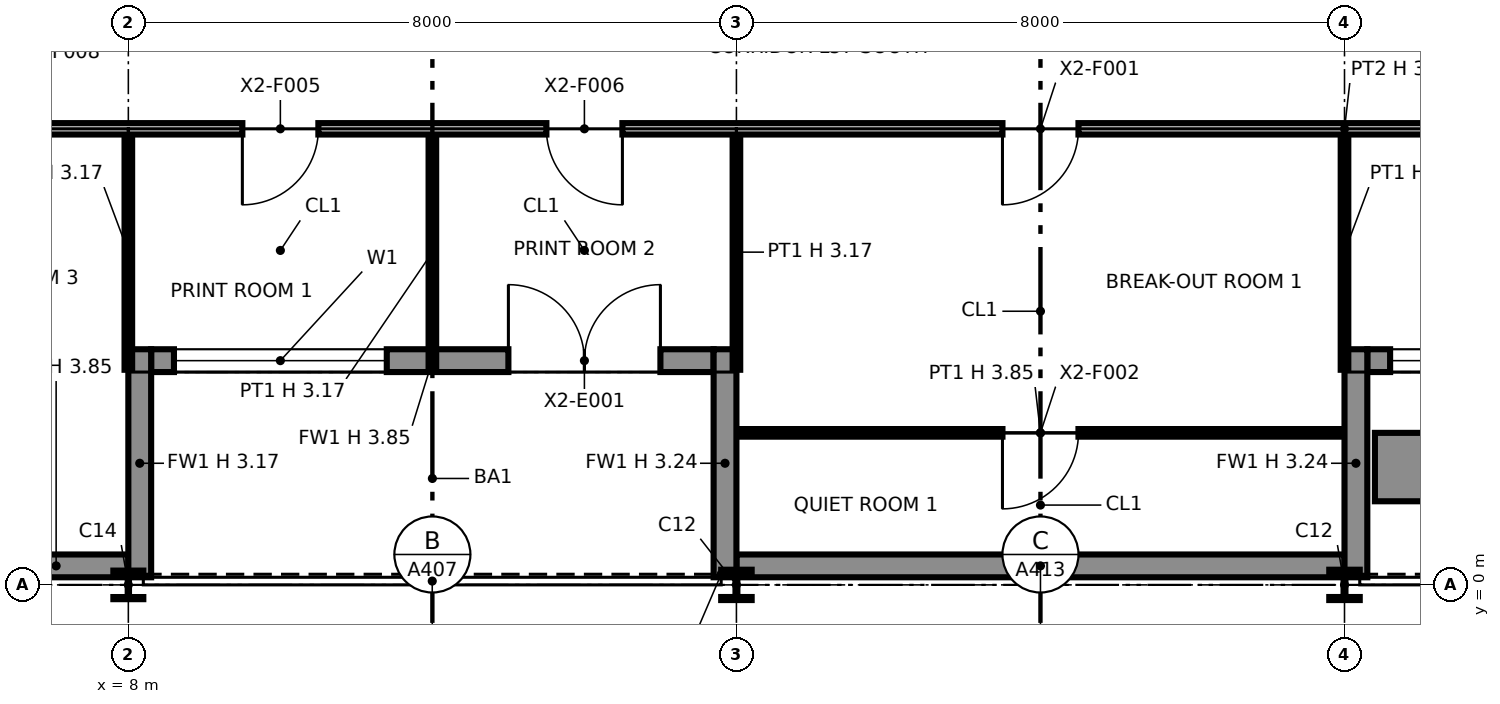
"""IFC4 building model, lengths in metres.
Left out: names, types, materials, properties, quantities, classifications, styles, units other than length and angle.
Written with IfcOpenShell. Run it as: python <this file> out.ifc"""

import sys

from ifc_helpers import new_model, si_unit, direction, frame, frame_2d, origin, origin_2d, place, context, subcontext, project, spatial, rectangle, i_section, extrude, element, fill, save


model = new_model("IFC4")
c1 = context("Model", 3, precision=1e-05, world=origin(), true_north=direction((0.0, 1.0)))
c2 = subcontext(c1, "Body", "Model", "MODEL_VIEW")
j1 = project(units=[si_unit("LENGTHUNIT", "METRE"), si_unit("PLANEANGLEUNIT", "RADIAN")], contexts=[c1])
p1 = place(None, origin())
s1 = spatial("IfcSite", under=j1, at=p1, CompositionType="ELEMENT")
p2 = place(p1, origin())
s2 = spatial("IfcBuilding", under=s1, at=p2, CompositionType="ELEMENT")
p3 = place(p2, frame((0.0, 0.0, 263.0)))
s3 = spatial("IfcBuildingStorey", under=s2, at=p3, CompositionType="ELEMENT", Elevation=263.0)
p4 = place(p3, frame((8.0, 0.0, 0.0), z_axis=(0.0, 0.0, 1.0), x_axis=(1.0, 0.0, 0.0)))
e1 = element("IfcColumn", 1, at=p4, inside=s3, PredefinedType="COLUMN", context=c2, shape_type="SweptSolid", body=[
    extrude(i_section(OverallWidth=0.394, OverallDepth=0.376, WebThickness=0.017, FlangeThickness=0.028, at=origin_2d()), origin(), (0.0, 0.0, 1.0), 3.85),
])
for number, where, z_axis, x_axis in (
    (2, (16.0, 0.0, 0.0), (0.0, 0.0, 1.0), (1.0, 0.0, 0.0)),
    (3, (24.0, 0.0, 0.0), (0.0, 0.0, 1.0), (1.0, 0.0, 0.0)),
):
    element("IfcColumn", number, at=place(p3, frame(where, z_axis=z_axis, x_axis=x_axis)), inside=s3, PredefinedType="COLUMN", context=c2, shape_type="SweptSolid", body=[
        extrude(i_section(OverallWidth=0.401, OverallDepth=0.399, WebThickness=0.025, FlangeThickness=0.04, at=origin_2d()), origin(), (0.0, 0.0, 1.0), 3.85),
    ])
p5 = place(p3, frame((6.1, 0.25, 0.0), z_axis=(0.0, 0.0, 1.0), x_axis=(1.0, 0.0, 0.0)))
e4 = element("IfcWall", 4, at=p5, inside=s3, PredefinedType="SOLIDWALL", context=c2, shape_type="SweptSolid", body=[
    extrude(rectangle(XDim=1.9, YDim=0.3, at=frame_2d((0.95, 0.0))), origin(), (0.0, 0.0, 1.0), 3.85),
])
p6 = place(p3, frame((8.3, 2.95, 0.0), z_axis=(0.0, 0.0, 1.0), x_axis=(1.0, 0.0, 0.0)))
e5 = element("IfcWall", 5, at=p6, inside=s3, PredefinedType="SOLIDWALL", context=c2, shape_type="SweptSolid", body=[
    extrude(rectangle(XDim=7.4, YDim=0.3, at=frame_2d((3.7, 0.0))), origin(), (0.0, 0.0, 1.0), 3.85),
])
p7 = place(p6, frame((0.3, 0.0, 0.9)))
e6 = element("IfcOpeningElement", 6, at=p7, cuts=e5, PredefinedType="OPENING", context=c2, shape_type="SweptSolid", body=[
    extrude(rectangle(XDim=2.8, YDim=2.2, at=frame_2d((1.4, 1.1))), frame((0.0, 0.16, 0.0), z_axis=(0.0, -1.0, 0.0), x_axis=(1.0, 0.0, 0.0)), (0.0, 0.0, 1.0), 0.32),
])
p8 = place(p6, frame((4.7, 0.0, 0.0)))
e7 = element("IfcOpeningElement", 7, at=p8, cuts=e5, PredefinedType="OPENING", context=c2, shape_type="SweptSolid", body=[
    extrude(rectangle(XDim=2.0, YDim=2.4, at=frame_2d((1.0, 1.2))), frame((0.0, 0.16, 0.0), z_axis=(0.0, -1.0, 0.0), x_axis=(1.0, 0.0, 0.0)), (0.0, 0.0, 1.0), 0.32),
])
p9 = place(p3, frame((8.15, 0.1, 0.0), z_axis=(0.0, 0.0, 1.0), x_axis=(0.0, 1.0, 0.0)))
e8 = element("IfcWall", 8, at=p9, inside=s3, PredefinedType="SOLIDWALL", context=c2, shape_type="SweptSolid", body=[
    extrude(rectangle(XDim=3.0, YDim=0.3, at=frame_2d((1.5, 0.0))), origin(), (0.0, 0.0, 1.0), 3.171),
])
p10 = place(p3, frame((15.85, 0.1, 0.0), z_axis=(0.0, 0.0, 1.0), x_axis=(0.0, 1.0, 0.0)))
e9 = element("IfcWall", 9, at=p10, inside=s3, PredefinedType="SOLIDWALL", context=c2, shape_type="SweptSolid", body=[
    extrude(rectangle(XDim=3.0, YDim=0.3, at=frame_2d((1.5, 0.0))), origin(), (0.0, 0.0, 1.0), 3.237),
])
p11 = place(p3, frame((16.0, 0.25, 0.0), z_axis=(0.0, 0.0, 1.0), x_axis=(1.0, 0.0, 0.0)))
e10 = element("IfcWall", 10, at=p11, inside=s3, PredefinedType="SOLIDWALL", context=c2, shape_type="SweptSolid", body=[
    extrude(rectangle(XDim=8.0, YDim=0.3, at=frame_2d((4.0, 0.0))), origin(), (0.0, 0.0, 1.0), 3.85),
])
p12 = place(p3, frame((24.3, 2.95, 0.0), z_axis=(0.0, 0.0, 1.0), x_axis=(1.0, 0.0, 0.0)))
e11 = element("IfcWall", 11, at=p12, inside=s3, PredefinedType="SOLIDWALL", context=c2, shape_type="SweptSolid", body=[
    extrude(rectangle(XDim=7.4, YDim=0.3, at=frame_2d((3.7, 0.0))), origin(), (0.0, 0.0, 1.0), 3.85),
])
p13 = place(p12, frame((0.3, 0.0, 0.9)))
e12 = element("IfcOpeningElement", 12, at=p13, cuts=e11, PredefinedType="OPENING", context=c2, shape_type="SweptSolid", body=[
    extrude(rectangle(XDim=2.8, YDim=2.2, at=frame_2d((1.4, 1.1))), frame((0.0, 0.16, 0.0), z_axis=(0.0, -1.0, 0.0), x_axis=(1.0, 0.0, 0.0)), (0.0, 0.0, 1.0), 0.32),
])
p14 = place(p12, frame((4.7, 0.0, 0.0)))
e13 = element("IfcOpeningElement", 13, at=p14, cuts=e11, PredefinedType="OPENING", context=c2, shape_type="SweptSolid", body=[
    extrude(rectangle(XDim=2.0, YDim=2.4, at=frame_2d((1.0, 1.2))), frame((0.0, 0.16, 0.0), z_axis=(0.0, -1.0, 0.0), x_axis=(1.0, 0.0, 0.0)), (0.0, 0.0, 1.0), 0.32),
])
p15 = place(p3, frame((24.15, 0.1, 0.0), z_axis=(0.0, 0.0, 1.0), x_axis=(0.0, 1.0, 0.0)))
e14 = element("IfcWall", 14, at=p15, inside=s3, PredefinedType="SOLIDWALL", context=c2, shape_type="SweptSolid", body=[
    extrude(rectangle(XDim=3.0, YDim=0.3, at=frame_2d((1.5, 0.0))), origin(), (0.0, 0.0, 1.0), 3.237),
])
p16 = place(p3, frame((24.4, 1.55, 0.0), z_axis=(0.0, 0.0, 1.0), x_axis=(1.0, 0.0, 0.0)))
e15 = element("IfcWall", 15, at=p16, inside=s3, PredefinedType="SOLIDWALL", context=c2, shape_type="SweptSolid", body=[
    extrude(rectangle(XDim=3.2, YDim=0.9, at=frame_2d((1.6, 0.0))), origin(), (0.0, 0.0, 1.0), 0.6),
])
p17 = place(p3, frame((16.03, 2.0, 0.0), z_axis=(0.0, 0.0, 1.0), x_axis=(1.0, 0.0, 0.0)))
e16 = element("IfcWall", 16, at=p17, inside=s3, PredefinedType="PARTITIONING", context=c2, shape_type="SweptSolid", body=[
    extrude(rectangle(XDim=7.94, YDim=0.1, at=frame_2d((3.97, 0.0))), origin(), (0.0, 0.0, 1.0), 3.85),
])
p18 = place(p17, frame((4.47, 0.0, 0.0), z_axis=(0.0, 0.0, 1.0), x_axis=(-1.0, 0.0, 0.0)))
e17 = element("IfcOpeningElement", 17, at=p18, cuts=e16, PredefinedType="OPENING", context=c2, shape_type="SweptSolid", body=[
    extrude(rectangle(XDim=1.0, YDim=2.1, at=frame_2d((0.5, 1.05))), frame((0.0, 0.06, 0.0), z_axis=(0.0, -1.0, 0.0), x_axis=(1.0, 0.0, 0.0)), (0.0, 0.0, 1.0), 0.12),
])
for number, where, z_axis, x_axis in (
    (18, (8.0, 2.83, 0.0), (0.0, 0.0, 1.0), (0.0, 1.0, 0.0)),
    (19, (12.0, 2.83, 0.0), (0.0, 0.0, 1.0), (0.0, 1.0, 0.0)),
    (20, (16.0, 2.83, 0.0), (0.0, 0.0, 1.0), (0.0, 1.0, 0.0)),
    (21, (24.0, 2.83, 0.0), (0.0, 0.0, 1.0), (0.0, 1.0, 0.0)),
):
    element("IfcWall", number, at=place(p3, frame(where, z_axis=z_axis, x_axis=x_axis)), inside=s3, PredefinedType="PARTITIONING", context=c2, shape_type="SweptSolid", body=[
        extrude(rectangle(XDim=3.095, YDim=0.1, at=frame_2d((1.547, 0.0))), origin(), (0.0, 0.0, 1.0), 3.172),
    ])
p19 = place(p3, frame((6.075, 6.0, 0.0), z_axis=(0.0, 0.0, 1.0), x_axis=(1.0, 0.0, 0.0)))
e22 = element("IfcWall", 22, at=p19, inside=s3, PredefinedType="PARTITIONING", context=c2, shape_type="SweptSolid", body=[
    extrude(rectangle(XDim=35.85, YDim=0.15, at=frame_2d((17.925, 0.0))), origin(), (0.0, 0.0, 1.0), 3.85),
])
p20 = place(p19, frame((14.425, 0.0, 0.0), z_axis=(0.0, 0.0, 1.0), x_axis=(-1.0, 0.0, 0.0)))
e23 = element("IfcOpeningElement", 23, at=p20, cuts=e22, PredefinedType="OPENING", context=c2, shape_type="SweptSolid", body=[
    extrude(rectangle(XDim=1.0, YDim=2.1, at=frame_2d((0.5, 1.05))), frame((0.0, 0.085, 0.0), z_axis=(0.0, -1.0, 0.0), x_axis=(1.0, 0.0, 0.0)), (0.0, 0.0, 1.0), 0.17),
])
p21 = place(p19, frame((30.425, 0.0, 0.0), z_axis=(0.0, 0.0, 1.0), x_axis=(-1.0, 0.0, 0.0)))
e24 = element("IfcOpeningElement", 24, at=p21, cuts=e22, PredefinedType="OPENING", context=c2, shape_type="SweptSolid", body=[
    extrude(rectangle(XDim=1.0, YDim=2.1, at=frame_2d((0.5, 1.05))), frame((0.0, 0.085, 0.0), z_axis=(0.0, -1.0, 0.0), x_axis=(1.0, 0.0, 0.0)), (0.0, 0.0, 1.0), 0.17),
])
p22 = place(p19, frame((4.425, 0.0, 0.0), z_axis=(0.0, 0.0, 1.0), x_axis=(-1.0, 0.0, 0.0)))
e25 = element("IfcOpeningElement", 25, at=p22, cuts=e22, PredefinedType="OPENING", context=c2, shape_type="SweptSolid", body=[
    extrude(rectangle(XDim=1.0, YDim=2.1, at=frame_2d((0.5, 1.05))), frame((0.0, 0.085, 0.0), z_axis=(0.0, -1.0, 0.0), x_axis=(1.0, 0.0, 0.0)), (0.0, 0.0, 1.0), 0.17),
])
p23 = place(p19, frame((8.425, 0.0, 0.0), z_axis=(0.0, 0.0, 1.0), x_axis=(-1.0, 0.0, 0.0)))
e26 = element("IfcOpeningElement", 26, at=p23, cuts=e22, PredefinedType="OPENING", context=c2, shape_type="SweptSolid", body=[
    extrude(rectangle(XDim=1.0, YDim=2.1, at=frame_2d((0.5, 1.05))), frame((0.0, 0.085, 0.0), z_axis=(0.0, -1.0, 0.0), x_axis=(1.0, 0.0, 0.0)), (0.0, 0.0, 1.0), 0.17),
])
p24 = place(p19, frame((23.425, 0.0, 0.0), z_axis=(0.0, 0.0, 1.0), x_axis=(-1.0, 0.0, 0.0)))
e27 = element("IfcOpeningElement", 27, at=p24, cuts=e22, PredefinedType="OPENING", context=c2, shape_type="SweptSolid", body=[
    extrude(rectangle(XDim=1.0, YDim=2.1, at=frame_2d((0.5, 1.05))), frame((0.0, 0.085, 0.0), z_axis=(0.0, -1.0, 0.0), x_axis=(1.0, 0.0, 0.0)), (0.0, 0.0, 1.0), 0.17),
])
p25 = place(p19, frame((35.425, 0.0, 0.0), z_axis=(0.0, 0.0, 1.0), x_axis=(-1.0, 0.0, 0.0)))
e28 = element("IfcOpeningElement", 28, at=p25, cuts=e22, PredefinedType="OPENING", context=c2, shape_type="SweptSolid", body=[
    extrude(rectangle(XDim=1.0, YDim=2.1, at=frame_2d((0.5, 1.05))), frame((0.0, 0.085, 0.0), z_axis=(0.0, -1.0, 0.0), x_axis=(1.0, 0.0, 0.0)), (0.0, 0.0, 1.0), 0.17),
])
p26 = place(p7, origin())
e29 = element("IfcWindow", 29, at=p26, inside=s3, PartitioningType="SINGLE_PANEL", PredefinedType="WINDOW", context=c2, shape_type="SweptSolid", body=[
    extrude(rectangle(XDim=2.8, YDim=2.2, at=frame_2d((1.4, 1.1))), frame((0.0, 0.03, 0.0), z_axis=(0.0, -1.0, 0.0), x_axis=(1.0, 0.0, 0.0)), (0.0, 0.0, 1.0), 0.06),
])
fill(e6, e29)
p27 = place(p8, origin())
e30 = element("IfcDoor", 30, at=p27, inside=s3, OperationType="DOUBLE_DOOR_SINGLE_SWING", PredefinedType="DOOR", context=c2, shape_type="SweptSolid", body=[
    extrude(rectangle(XDim=2.0, YDim=2.4, at=frame_2d((1.0, 1.2))), frame((0.0, 0.025, 0.0), z_axis=(0.0, -1.0, 0.0), x_axis=(1.0, 0.0, 0.0)), (0.0, 0.0, 1.0), 0.05),
])
fill(e7, e30)
p28 = place(p13, origin())
e31 = element("IfcWindow", 31, at=p28, inside=s3, PartitioningType="SINGLE_PANEL", PredefinedType="WINDOW", context=c2, shape_type="SweptSolid", body=[
    extrude(rectangle(XDim=2.8, YDim=2.2, at=frame_2d((1.4, 1.1))), frame((0.0, 0.03, 0.0), z_axis=(0.0, -1.0, 0.0), x_axis=(1.0, 0.0, 0.0)), (0.0, 0.0, 1.0), 0.06),
])
fill(e12, e31)
p29 = place(p20, origin())
e32 = element("IfcDoor", 32, at=p29, inside=s3, OperationType="SINGLE_SWING_RIGHT", PredefinedType="DOOR", context=c2, shape_type="SweptSolid", body=[
    extrude(rectangle(XDim=1.0, YDim=2.1, at=frame_2d((0.5, 1.05))), frame((0.0, 0.025, 0.0), z_axis=(0.0, -1.0, 0.0), x_axis=(1.0, 0.0, 0.0)), (0.0, 0.0, 1.0), 0.05),
])
fill(e23, e32)
p30 = place(p18, origin())
e33 = element("IfcDoor", 33, at=p30, inside=s3, OperationType="SINGLE_SWING_RIGHT", PredefinedType="DOOR", context=c2, shape_type="SweptSolid", body=[
    extrude(rectangle(XDim=1.0, YDim=2.1, at=frame_2d((0.5, 1.05))), frame((0.0, 0.025, 0.0), z_axis=(0.0, -1.0, 0.0), x_axis=(1.0, 0.0, 0.0)), (0.0, 0.0, 1.0), 0.05),
])
fill(e17, e33)
p31 = place(p22, origin())
e34 = element("IfcDoor", 34, at=p31, inside=s3, OperationType="SINGLE_SWING_RIGHT", PredefinedType="DOOR", context=c2, shape_type="SweptSolid", body=[
    extrude(rectangle(XDim=1.0, YDim=2.1, at=frame_2d((0.5, 1.05))), frame((0.0, 0.025, 0.0), z_axis=(0.0, -1.0, 0.0), x_axis=(1.0, 0.0, 0.0)), (0.0, 0.0, 1.0), 0.05),
])
fill(e25, e34)
p32 = place(p23, origin())
e35 = element("IfcDoor", 35, at=p32, inside=s3, OperationType="SINGLE_SWING_LEFT", PredefinedType="DOOR", context=c2, shape_type="SweptSolid", body=[
    extrude(rectangle(XDim=1.0, YDim=2.1, at=frame_2d((0.5, 1.05))), frame((0.0, 0.025, 0.0), z_axis=(0.0, -1.0, 0.0), x_axis=(1.0, 0.0, 0.0)), (0.0, 0.0, 1.0), 0.05),
])
fill(e26, e35)
save(model, sys.argv[1])
